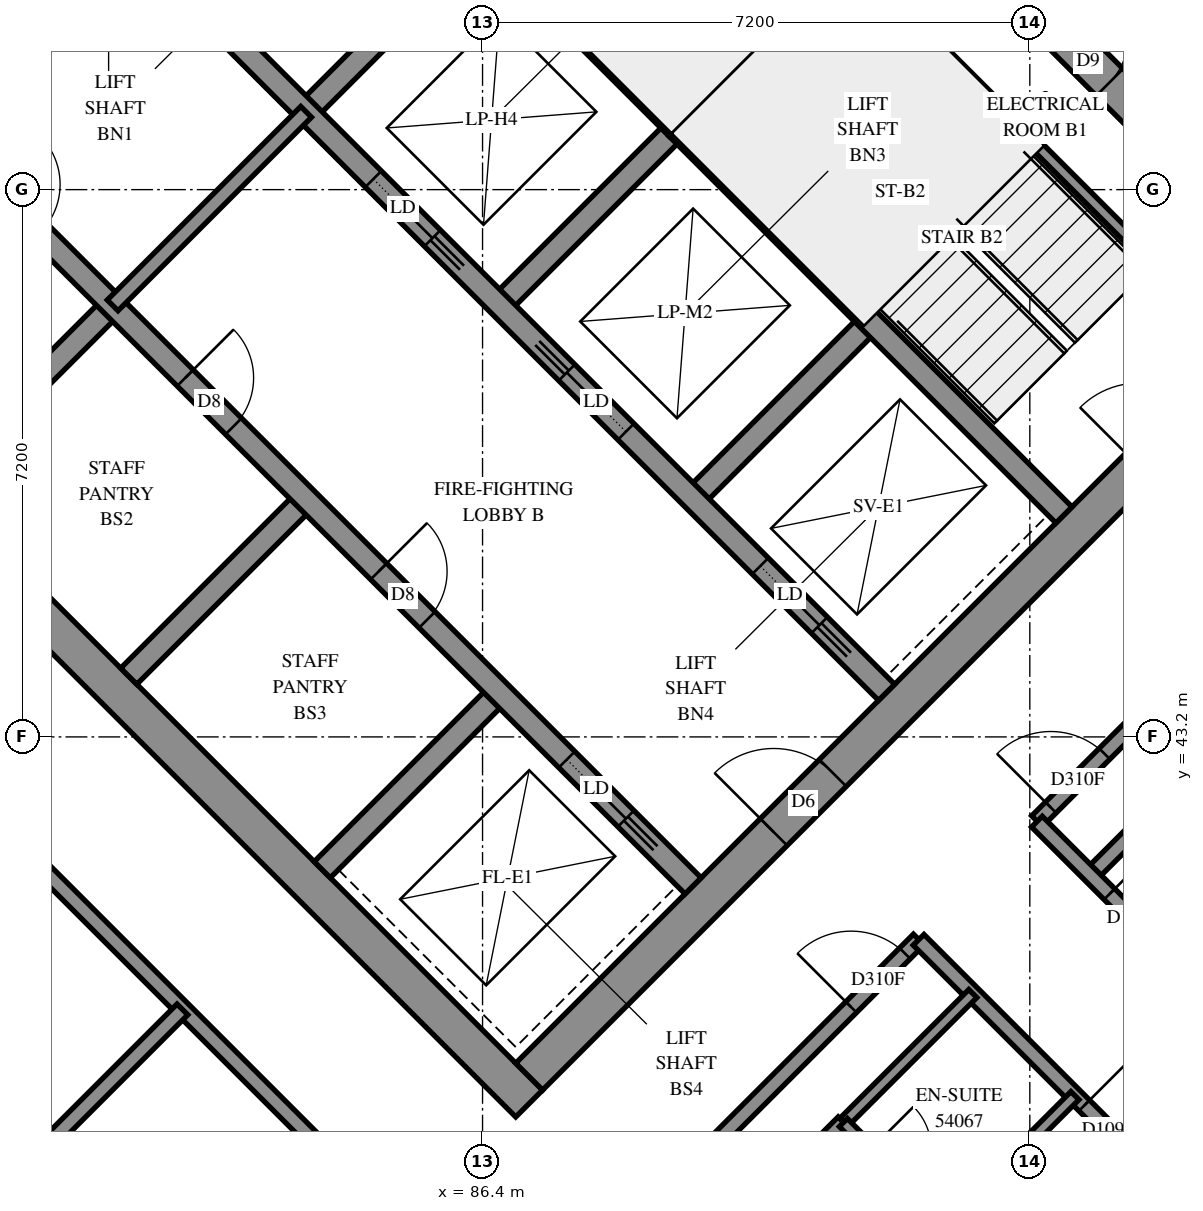
"""IFC4 building model, lengths in metres.
Left out: names, types, materials, properties, quantities, classifications, styles, units other than length and angle.
Written with IfcOpenShell. Run it as: python <this file> out.ifc"""

import sys

from ifc_helpers import new_model, si_unit, direction, frame, frame_2d, origin, place, context, subcontext, project, spatial, rectangle, extrude, element, fill, save


model = new_model("IFC4")
c1 = context("Model", 3, precision=1e-05, world=origin(), true_north=direction((0.0, 1.0)))
c2 = subcontext(c1, "Body", "Model", "MODEL_VIEW")
j1 = project(units=[si_unit("LENGTHUNIT", "METRE"), si_unit("PLANEANGLEUNIT", "RADIAN")], contexts=[c1])
p1 = place(None, origin())
s1 = spatial("IfcSite", under=j1, at=p1, CompositionType="ELEMENT")
p2 = place(p1, origin())
s2 = spatial("IfcBuilding", under=s1, at=p2, CompositionType="ELEMENT")
p3 = place(p2, frame((0.0, 0.0, 199.8)))
s3 = spatial("IfcBuildingStorey", under=s2, at=p3, CompositionType="ELEMENT", Elevation=199.8)
p4 = place(p3, frame((76.124, 49.267, -0.3), z_axis=(0.0, 0.0, 1.0), x_axis=(0.7071067812, -0.7071067812, 0.0)))
e1 = element("IfcWall", 1, at=p4, inside=s3, PredefinedType="SHEAR", context=c2, shape_type="SweptSolid", body=[
    extrude(rectangle(XDim=15.4, YDim=0.5, at=frame_2d((7.7, 0.0))), origin(), (0.0, 0.0, 1.0), 2.7),
])
p5 = place(p3, frame((86.66, 59.802, -0.3), z_axis=(0.0, 0.0, 1.0), x_axis=(0.7071067812, -0.7071067812, 0.0)))
e2 = element("IfcWall", 2, at=p5, inside=s3, PredefinedType="SHEAR", context=c2, shape_type="SweptSolid", body=[
    extrude(rectangle(XDim=15.4, YDim=0.5, at=frame_2d((7.7, 0.0))), origin(), (0.0, 0.0, 1.0), 2.7),
])
p6 = place(p5, frame((10.5, 0.0, 0.3)))
e3 = element("IfcOpeningElement", 3, at=p6, cuts=e2, PredefinedType="OPENING", context=c2, shape_type="SweptSolid", body=[
    extrude(rectangle(XDim=0.8, YDim=2.1, at=frame_2d((0.4, 1.05))), frame((0.0, 0.26, 0.0), z_axis=(0.0, -1.0, 0.0), x_axis=(1.0, 0.0, 0.0)), (0.0, 0.0, 1.0), 0.52),
])
p7 = place(p3, frame((76.478, 49.267, -0.3), z_axis=(0.0, 0.0, 1.0), x_axis=(0.7071067812, 0.7071067812, 0.0)))
e4 = element("IfcWall", 4, at=p7, inside=s3, PredefinedType="SHEAR", context=c2, shape_type="SweptSolid", body=[
    extrude(rectangle(XDim=14.4, YDim=0.5, at=frame_2d((7.2, 0.0))), origin(), (0.0, 0.0, 1.0), 2.7),
])
p8 = place(p7, frame((4.55, 0.0, 0.3)))
e5 = element("IfcOpeningElement", 5, at=p8, cuts=e4, PredefinedType="OPENING", context=c2, shape_type="SweptSolid", body=[
    extrude(rectangle(XDim=1.1, YDim=2.1, at=frame_2d((0.55, 1.05))), frame((0.0, 0.26, 0.0), z_axis=(0.0, -1.0, 0.0), x_axis=(1.0, 0.0, 0.0)), (0.0, 0.0, 1.0), 0.52),
])
p9 = place(p7, frame((11.35, 0.0, 0.3)))
e6 = element("IfcOpeningElement", 6, at=p9, cuts=e4, PredefinedType="OPENING", context=c2, shape_type="SweptSolid", body=[
    extrude(rectangle(XDim=1.1, YDim=2.1, at=frame_2d((0.55, 1.05))), frame((0.0, 0.26, 0.0), z_axis=(0.0, -1.0, 0.0), x_axis=(1.0, 0.0, 0.0)), (0.0, 0.0, 1.0), 0.52),
])
p10 = place(p3, frame((87.013, 38.731, -0.3), z_axis=(0.0, 0.0, 1.0), x_axis=(0.7071067812, 0.7071067812, 0.0)))
e7 = element("IfcWall", 7, at=p10, inside=s3, PredefinedType="SHEAR", context=c2, shape_type="SweptSolid", body=[
    extrude(rectangle(XDim=14.4, YDim=0.5, at=frame_2d((7.2, 0.0))), origin(), (0.0, 0.0, 1.0), 2.7),
])
p11 = place(p10, frame((4.55, 0.0, 0.3)))
e8 = element("IfcOpeningElement", 8, at=p11, cuts=e7, PredefinedType="OPENING", context=c2, shape_type="SweptSolid", body=[
    extrude(rectangle(XDim=1.1, YDim=2.1, at=frame_2d((0.55, 1.05))), frame((0.0, 0.26, 0.0), z_axis=(0.0, -1.0, 0.0), x_axis=(1.0, 0.0, 0.0)), (0.0, 0.0, 1.0), 0.52),
])
p12 = place(p10, frame((11.35, 0.0, 0.3)))
e9 = element("IfcOpeningElement", 9, at=p12, cuts=e7, PredefinedType="OPENING", context=c2, shape_type="SweptSolid", body=[
    extrude(rectangle(XDim=1.1, YDim=2.1, at=frame_2d((0.55, 1.05))), frame((0.0, 0.26, 0.0), z_axis=(0.0, -1.0, 0.0), x_axis=(1.0, 0.0, 0.0)), (0.0, 0.0, 1.0), 0.52),
])
for number, where, z_axis, x_axis in (
    (10, (79.2, 46.544, 0.0), (0.0, 0.0, 1.0), (0.707, 0.707, 0.0)),
    (11, (84.079, 51.423, 0.0), (0.0, 0.0, 1.0), (0.707, 0.707, 0.0)),
):
    element("IfcWall", number, at=place(p3, frame(where, z_axis=z_axis, x_axis=x_axis)), inside=s3, PredefinedType="SOLIDWALL", context=c2, shape_type="SweptSolid", body=[
        extrude(rectangle(XDim=3.3, YDim=0.3, at=frame_2d((1.65, 0.0))), origin(), (0.0, 0.0, 1.0), 3.1),
    ])
p13 = place(p3, frame((81.746, 43.999, 0.0), z_axis=(0.0, 0.0, 1.0), x_axis=(0.7071067812, 0.7071067812, 0.0)))
e12 = element("IfcWall", 12, at=p13, inside=s3, PredefinedType="SOLIDWALL", context=c2, shape_type="SweptSolid", body=[
    extrude(rectangle(XDim=3.3, YDim=0.3, at=frame_2d((1.65, 0.0))), origin(), (0.0, 0.0, 1.0), 3.1),
])
p14 = place(p3, frame((86.625, 48.878, 0.0), z_axis=(0.0, 0.0, 1.0), x_axis=(0.7071067812, 0.7071067812, 0.0)))
e13 = element("IfcWall", 13, at=p14, inside=s3, PredefinedType="SOLIDWALL", context=c2, shape_type="SweptSolid", body=[
    extrude(rectangle(XDim=3.3, YDim=0.3, at=frame_2d((1.65, 0.0))), origin(), (0.0, 0.0, 1.0), 3.1),
])
p15 = place(p3, frame((84.291, 41.453, 0.0), z_axis=(0.0, 0.0, 1.0), x_axis=(0.7071067812, 0.7071067812, 0.0)))
e14 = element("IfcWall", 14, at=p15, inside=s3, PredefinedType="SOLIDWALL", context=c2, shape_type="SweptSolid", body=[
    extrude(rectangle(XDim=3.3, YDim=0.3, at=frame_2d((1.65, 0.0))), origin(), (0.0, 0.0, 1.0), 3.1),
])
p16 = place(p3, frame((89.17, 46.332, 0.0), z_axis=(0.0, 0.0, 1.0), x_axis=(0.7071067812, 0.7071067812, 0.0)))
e15 = element("IfcWall", 15, at=p16, inside=s3, PredefinedType="SOLIDWALL", context=c2, shape_type="SweptSolid", body=[
    extrude(rectangle(XDim=3.3, YDim=0.3, at=frame_2d((1.65, 0.0))), origin(), (0.0, 0.0, 1.0), 3.1),
])
p17 = place(p3, frame((78.988, 51.423, 0.0), z_axis=(0.0, 0.0, 1.0), x_axis=(0.7071067812, -0.7071067812, 0.0)))
e16 = element("IfcWall", 16, at=p17, inside=s3, PredefinedType="SOLIDWALL", context=c2, shape_type="SweptSolid", body=[
    extrude(rectangle(XDim=14.4, YDim=0.3, at=frame_2d((7.2, 0.0))), origin(), (0.0, 0.0, 1.0), 3.1),
])
p18 = place(p17, frame((1.35, 0.0, 0.0)))
e17 = element("IfcOpeningElement", 17, at=p18, cuts=e16, PredefinedType="OPENING", context=c2, shape_type="SweptSolid", body=[
    extrude(rectangle(XDim=0.9, YDim=2.1, at=frame_2d((0.45, 1.05))), frame((0.0, 0.16, 0.0), z_axis=(0.0, -1.0, 0.0), x_axis=(1.0, 0.0, 0.0)), (0.0, 0.0, 1.0), 0.32),
])
p19 = place(p17, frame((4.95, 0.0, 0.0)))
e18 = element("IfcOpeningElement", 18, at=p19, cuts=e16, PredefinedType="OPENING", context=c2, shape_type="SweptSolid", body=[
    extrude(rectangle(XDim=0.9, YDim=2.1, at=frame_2d((0.45, 1.05))), frame((0.0, 0.16, 0.0), z_axis=(0.0, -1.0, 0.0), x_axis=(1.0, 0.0, 0.0)), (0.0, 0.0, 1.0), 0.32),
])
p20 = place(p17, frame((8.55, 0.0, 0.0)))
e19 = element("IfcOpeningElement", 19, at=p20, cuts=e16, PredefinedType="OPENING", context=c2, shape_type="SweptSolid", body=[
    extrude(rectangle(XDim=0.9, YDim=2.1, at=frame_2d((0.45, 1.05))), frame((0.0, 0.16, 0.0), z_axis=(0.0, -1.0, 0.0), x_axis=(1.0, 0.0, 0.0)), (0.0, 0.0, 1.0), 0.32),
])
p21 = place(p17, frame((12.05, 0.0, 0.0)))
e20 = element("IfcOpeningElement", 20, at=p21, cuts=e16, PredefinedType="OPENING", context=c2, shape_type="SweptSolid", body=[
    extrude(rectangle(XDim=1.1, YDim=2.1, at=frame_2d((0.55, 1.05))), frame((0.0, 0.16, 0.0), z_axis=(0.0, -1.0, 0.0), x_axis=(1.0, 0.0, 0.0)), (0.0, 0.0, 1.0), 0.32),
])
p22 = place(p3, frame((81.534, 53.969, 0.0), z_axis=(0.0, 0.0, 1.0), x_axis=(0.707103309, -0.7071102534, 0.0)))
e21 = element("IfcWall", 21, at=p22, inside=s3, PredefinedType="SOLIDWALL", context=c2, shape_type="SweptSolid", body=[
    extrude(rectangle(XDim=14.4, YDim=0.3, at=frame_2d((7.2, 0.0))), origin(), (0.0, 0.0, 1.0), 3.1),
])
p23 = place(p22, frame((1.25, 0.0, 0.0)))
e22 = element("IfcOpeningElement", 22, at=p23, cuts=e21, PredefinedType="OPENING", context=c2, shape_type="SweptSolid", body=[
    extrude(rectangle(XDim=1.1, YDim=2.1, at=frame_2d((0.55, 1.05))), frame((0.0, 0.16, 0.0), z_axis=(0.0, -1.0, 0.0), x_axis=(1.0, 0.0, 0.0)), (0.0, 0.0, 1.0), 0.32),
])
p24 = place(p22, frame((4.85, 0.0, 0.0)))
e23 = element("IfcOpeningElement", 23, at=p24, cuts=e21, PredefinedType="OPENING", context=c2, shape_type="SweptSolid", body=[
    extrude(rectangle(XDim=1.1, YDim=2.1, at=frame_2d((0.55, 1.05))), frame((0.0, 0.16, 0.0), z_axis=(0.0, -1.0, 0.0), x_axis=(1.0, 0.0, 0.0)), (0.0, 0.0, 1.0), 0.32),
])
p25 = place(p22, frame((8.45, 0.0, 0.0)))
e24 = element("IfcOpeningElement", 24, at=p25, cuts=e21, PredefinedType="OPENING", context=c2, shape_type="SweptSolid", body=[
    extrude(rectangle(XDim=1.1, YDim=2.1, at=frame_2d((0.55, 1.05))), frame((0.0, 0.16, 0.0), z_axis=(0.0, -1.0, 0.0), x_axis=(1.0, 0.0, 0.0)), (0.0, 0.0, 1.0), 0.32),
])
p26 = place(p22, frame((12.05, 0.0, 0.0)))
e25 = element("IfcOpeningElement", 25, at=p26, cuts=e21, PredefinedType="OPENING", context=c2, shape_type="SweptSolid", body=[
    extrude(rectangle(XDim=1.1, YDim=2.1, at=frame_2d((0.55, 1.05))), frame((0.0, 0.16, 0.0), z_axis=(0.0, -1.0, 0.0), x_axis=(1.0, 0.0, 0.0)), (0.0, 0.0, 1.0), 0.32),
])
for number, where, z_axis, x_axis in (
    (26, (83.867, 56.302, 0.0), (0.0, 0.0, 1.0), (0.707, -0.707, 0.0)),
    (27, (88.958, 51.211, 0.0), (0.0, 0.0, 1.0), (0.707, -0.707, 0.0)),
):
    element("IfcWall", number, at=place(p3, frame(where, z_axis=z_axis, x_axis=x_axis)), inside=s3, PredefinedType="SOLIDWALL", context=c2, shape_type="SweptSolid", body=[
        extrude(rectangle(XDim=7.2, YDim=0.3, at=frame_2d((3.6, 0.0))), origin(), (0.0, 0.0, 1.0), 3.1),
    ])
p27 = place(p3, frame((88.958, 51.211, 0.0), z_axis=(0.0, 0.0, 1.0), x_axis=(0.7071067812, 0.7071067812, 0.0)))
e28 = element("IfcWall", 28, at=p27, inside=s3, PredefinedType="SOLIDWALL", context=c2, shape_type="SweptSolid", body=[
    extrude(rectangle(XDim=4.2, YDim=0.3, at=frame_2d((2.1, 0.0))), origin(), (0.0, 0.0, 1.0), 3.1),
])
p28 = place(p3, frame((91.313, 53.354, 0.0), z_axis=(0.0, 0.0, 1.0), x_axis=(0.7071067812, -0.7071067812, 0.0)))
e29 = element("IfcWall", 29, at=p28, inside=s3, PredefinedType="PARTITIONING", context=c2, shape_type="SweptSolid", body=[
    extrude(rectangle(XDim=5.95, YDim=0.15, at=frame_2d((2.975, 0.0))), origin(), (0.0, 0.0, 1.0), 3.1),
])
p29 = place(p3, frame((81.534, 48.878, 0.0), z_axis=(0.0, 0.0, 1.0), x_axis=(0.707092892, 0.7071206701, 0.0)))
e30 = element("IfcWall", 30, at=p29, inside=s3, PredefinedType="PARTITIONING", context=c2, shape_type="SweptSolid", body=[
    extrude(rectangle(XDim=3.6, YDim=0.2, at=frame_2d((1.8, 0.0))), origin(), (0.0, 0.0, 1.0), 3.1),
])
p30 = place(p3, frame((93.695, 42.091, 0.0), z_axis=(0.0, 0.0, 1.0), x_axis=(0.7071067812, 0.7071067812, 0.0)))
e31 = element("IfcWall", 31, at=p30, inside=s3, PredefinedType="PARTITIONING", context=c2, shape_type="SweptSolid", body=[
    extrude(rectangle(XDim=9.899, YDim=0.2, at=frame_2d((4.95, 0.0))), origin(), (0.0, 0.0, 1.0), 3.1),
])
p31 = place(p30, frame((0.255, 0.0, 0.0)))
e32 = element("IfcOpeningElement", 32, at=p31, cuts=e31, PredefinedType="OPENING", context=c2, shape_type="SweptSolid", body=[
    extrude(rectangle(XDim=1.0, YDim=2.1, at=frame_2d((0.5, 1.05))), frame((0.0, 0.11, 0.0), z_axis=(0.0, -1.0, 0.0), x_axis=(1.0, 0.0, 0.0)), (0.0, 0.0, 1.0), 0.22),
])
p32 = place(p3, frame((84.984, 31.966, 0.0), z_axis=(0.0, 0.0, 1.0), x_axis=(0.7071067812, 0.7071067812, 0.0)))
e33 = element("IfcWall", 33, at=p32, inside=s3, PredefinedType="PARTITIONING", context=c2, shape_type="SweptSolid", body=[
    extrude(rectangle(XDim=8.719, YDim=0.2, at=frame_2d((4.359, 0.0))), origin(), (0.0, 0.0, 1.0), 3.1),
])
p33 = place(p3, frame((86.835, 35.231, 0.0), z_axis=(0.0, 0.0, 1.0), x_axis=(0.7071067812, 0.7071067812, 0.0)))
e34 = element("IfcWall", 34, at=p33, inside=s3, PredefinedType="PARTITIONING", context=c2, shape_type="SweptSolid", body=[
    extrude(rectangle(XDim=7.501, YDim=0.2, at=frame_2d((3.751, 0.0))), origin(), (0.0, 0.0, 1.0), 3.1),
])
p34 = place(p33, frame((6.243, 0.0, 0.0)))
e35 = element("IfcOpeningElement", 35, at=p34, cuts=e34, PredefinedType="OPENING", context=c2, shape_type="SweptSolid", body=[
    extrude(rectangle(XDim=1.0, YDim=2.1, at=frame_2d((0.5, 1.05))), frame((0.0, 0.11, 0.0), z_axis=(0.0, -1.0, 0.0), x_axis=(1.0, 0.0, 0.0)), (0.0, 0.0, 1.0), 0.22),
])
p35 = place(p3, frame((80.522, 41.553, 0.0), z_axis=(0.0, 0.0, 1.0), x_axis=(0.7071067812, -0.7071067812, 0.0)))
e36 = element("IfcWall", 36, at=p35, inside=s3, PredefinedType="PARTITIONING", context=c2, shape_type="SweptSolid", body=[
    extrude(rectangle(XDim=6.836, YDim=0.2, at=frame_2d((3.418, 0.0))), origin(), (0.0, 0.0, 1.0), 3.1),
])
p36 = place(p3, frame((94.402, 41.382, 0.0), z_axis=(0.0, 0.0, 1.0), x_axis=(0.7072538072, 0.7069597246, 0.0)))
e37 = element("IfcWall", 37, at=p36, inside=s3, PredefinedType="PARTITIONING", context=c2, shape_type="SweptSolid", body=[
    extrude(rectangle(XDim=6.801, YDim=0.2, at=frame_2d((3.4, 0.0))), origin(), (0.0, 0.0, 1.0), 3.1),
])
p37 = place(p3, frame((93.693, 42.085, 0.0), z_axis=(0.0, 0.0, 1.0), x_axis=(0.7071067812, -0.7071067812, 0.0)))
e38 = element("IfcWall", 38, at=p37, inside=s3, PredefinedType="PARTITIONING", context=c2, shape_type="SweptSolid", body=[
    extrude(rectangle(XDim=4.599, YDim=0.2, at=frame_2d((2.3, 0.0))), origin(), (0.0, 0.0, 1.0), 3.1),
])
p38 = place(p37, frame((1.349, 0.0, 0.0)))
e39 = element("IfcOpeningElement", 39, at=p38, cuts=e38, PredefinedType="OPENING", context=c2, shape_type="SweptSolid", body=[
    extrude(rectangle(XDim=0.9, YDim=2.1, at=frame_2d((0.45, 1.05))), frame((0.0, 0.11, 0.0), z_axis=(0.0, -1.0, 0.0), x_axis=(1.0, 0.0, 0.0)), (0.0, 0.0, 1.0), 0.22),
])
p39 = place(p3, frame((92.137, 40.531, 0.0), z_axis=(0.0, 0.0, 1.0), x_axis=(0.7071067812, -0.7071067812, 0.0)))
e40 = element("IfcWall", 40, at=p39, inside=s3, PredefinedType="PARTITIONING", context=c2, shape_type="SweptSolid", body=[
    extrude(rectangle(XDim=4.599, YDim=0.2, at=frame_2d((2.3, 0.0))), origin(), (0.0, 0.0, 1.0), 3.1),
])
p40 = place(p39, frame((3.083, 0.0, 0.0)))
e41 = element("IfcOpeningElement", 41, at=p40, cuts=e40, PredefinedType="OPENING", context=c2, shape_type="SweptSolid", body=[
    extrude(rectangle(XDim=0.9, YDim=2.1, at=frame_2d((0.45, 1.05))), frame((0.0, 0.11, 0.0), z_axis=(0.0, -1.0, 0.0), x_axis=(1.0, 0.0, 0.0)), (0.0, 0.0, 1.0), 0.22),
])
p41 = place(p3, frame((79.651, 36.814, 0.0), z_axis=(0.0, 0.0, 1.0), x_axis=(0.7071194064, 0.7070941557, 0.0)))
e42 = element("IfcWall", 42, at=p41, inside=s3, PredefinedType="PARTITIONING", context=c2, shape_type="SweptSolid", body=[
    extrude(rectangle(XDim=3.96, YDim=0.2, at=frame_2d((1.98, 0.0))), origin(), (0.0, 0.0, 1.0), 3.1),
])
for number, where, z_axis, x_axis in (
    (43, (91.152, 38.128, 0.0), (0.0, 0.0, 1.0), (0.708, 0.707, 0.0)),
    (44, (92.497, 36.783, 0.0), (0.0, 0.0, 1.0), (0.707, 0.708, 0.0)),
):
    element("IfcWall", number, at=place(p3, frame(where, z_axis=z_axis, x_axis=x_axis)), inside=s3, PredefinedType="PARTITIONING", context=c2, shape_type="SweptSolid", body=[
        extrude(rectangle(XDim=2.4, YDim=0.15, at=frame_2d((1.2, 0.0))), origin(), (0.0, 0.0, 1.0), 3.1),
    ])
p42 = place(p3, frame((91.147, 38.127, 0.0), z_axis=(0.0, 0.0, 1.0), x_axis=(0.7071067812, -0.7071067812, 0.0)))
e45 = element("IfcWall", 45, at=p42, inside=s3, PredefinedType="PARTITIONING", context=c2, shape_type="SweptSolid", body=[
    extrude(rectangle(XDim=1.901, YDim=0.15, at=frame_2d((0.95, 0.0))), origin(), (0.0, 0.0, 1.0), 3.1),
])
p43 = place(p42, frame((0.506, 0.0, 0.0)))
e46 = element("IfcOpeningElement", 46, at=p43, cuts=e45, PredefinedType="OPENING", context=c2, shape_type="SweptSolid", body=[
    extrude(rectangle(XDim=0.8, YDim=2.1, at=frame_2d((0.4, 1.05))), frame((0.0, 0.085, 0.0), z_axis=(0.0, -1.0, 0.0), x_axis=(1.0, 0.0, 0.0)), (0.0, 0.0, 1.0), 0.17),
])
p44 = place(p6, origin())
e47 = element("IfcDoor", 47, at=p44, inside=s3, OperationType="SINGLE_SWING_RIGHT", PredefinedType="DOOR", context=c2, shape_type="SweptSolid", body=[
    extrude(rectangle(XDim=0.8, YDim=2.1, at=frame_2d((0.4, 1.05))), frame((0.0, 0.025, 0.0), z_axis=(0.0, -1.0, 0.0), x_axis=(1.0, 0.0, 0.0)), (0.0, 0.0, 1.0), 0.05),
])
fill(e3, e47)
p45 = place(p11, origin())
e48 = element("IfcDoor", 48, at=p45, inside=s3, OperationType="DOUBLE_DOOR_SINGLE_SWING", PredefinedType="DOOR", context=c2, shape_type="SweptSolid", body=[
    extrude(rectangle(XDim=1.1, YDim=2.1, at=frame_2d((0.55, 1.05))), frame((0.0, 0.025, 0.0), z_axis=(0.0, -1.0, 0.0), x_axis=(1.0, 0.0, 0.0)), (0.0, 0.0, 1.0), 0.05),
])
fill(e8, e48)
p46 = place(p19, origin())
e49 = element("IfcDoor", 49, at=p46, inside=s3, OperationType="SINGLE_SWING_LEFT", PredefinedType="DOOR", context=c2, shape_type="SweptSolid", body=[
    extrude(rectangle(XDim=0.9, YDim=2.1, at=frame_2d((0.45, 1.05))), frame((0.0, 0.025, 0.0), z_axis=(0.0, -1.0, 0.0), x_axis=(1.0, 0.0, 0.0)), (0.0, 0.0, 1.0), 0.05),
])
fill(e18, e49)
p47 = place(p20, origin())
e50 = element("IfcDoor", 50, at=p47, inside=s3, OperationType="SINGLE_SWING_LEFT", PredefinedType="DOOR", context=c2, shape_type="SweptSolid", body=[
    extrude(rectangle(XDim=0.9, YDim=2.1, at=frame_2d((0.45, 1.05))), frame((0.0, 0.025, 0.0), z_axis=(0.0, -1.0, 0.0), x_axis=(1.0, 0.0, 0.0)), (0.0, 0.0, 1.0), 0.05),
])
fill(e19, e50)
p48 = place(p21, origin())
e51 = element("IfcDoor", 51, at=p48, inside=s3, OperationType="SLIDING_TO_RIGHT", PredefinedType="DOOR", context=c2, shape_type="SweptSolid", body=[
    extrude(rectangle(XDim=1.1, YDim=2.1, at=frame_2d((0.55, 1.05))), frame((0.0, 0.025, 0.0), z_axis=(0.0, -1.0, 0.0), x_axis=(1.0, 0.0, 0.0)), (0.0, 0.0, 1.0), 0.05),
])
fill(e20, e51)
p49 = place(p24, origin())
e52 = element("IfcDoor", 52, at=p49, inside=s3, OperationType="SLIDING_TO_RIGHT", PredefinedType="DOOR", context=c2, shape_type="SweptSolid", body=[
    extrude(rectangle(XDim=1.1, YDim=2.1, at=frame_2d((0.55, 1.05))), frame((0.0, 0.025, 0.0), z_axis=(0.0, -1.0, 0.0), x_axis=(1.0, 0.0, 0.0)), (0.0, 0.0, 1.0), 0.05),
])
fill(e23, e52)
p50 = place(p25, origin())
e53 = element("IfcDoor", 53, at=p50, inside=s3, OperationType="SLIDING_TO_LEFT", PredefinedType="DOOR", context=c2, shape_type="SweptSolid", body=[
    extrude(rectangle(XDim=1.1, YDim=2.1, at=frame_2d((0.55, 1.05))), frame((0.0, 0.025, 0.0), z_axis=(0.0, -1.0, 0.0), x_axis=(1.0, 0.0, 0.0)), (0.0, 0.0, 1.0), 0.05),
])
fill(e24, e53)
p51 = place(p26, origin())
e54 = element("IfcDoor", 54, at=p51, inside=s3, OperationType="SLIDING_TO_RIGHT", PredefinedType="DOOR", context=c2, shape_type="SweptSolid", body=[
    extrude(rectangle(XDim=1.1, YDim=2.1, at=frame_2d((0.55, 1.05))), frame((0.0, 0.025, 0.0), z_axis=(0.0, -1.0, 0.0), x_axis=(1.0, 0.0, 0.0)), (0.0, 0.0, 1.0), 0.05),
])
fill(e25, e54)
p52 = place(p31, origin())
e55 = element("IfcDoor", 55, at=p52, inside=s3, OperationType="SINGLE_SWING_LEFT", PredefinedType="DOOR", context=c2, shape_type="SweptSolid", body=[
    extrude(rectangle(XDim=1.0, YDim=2.1, at=frame_2d((0.5, 1.05))), frame((0.0, 0.025, 0.0), z_axis=(0.0, -1.0, 0.0), x_axis=(1.0, 0.0, 0.0)), (0.0, 0.0, 1.0), 0.05),
])
fill(e32, e55)
p53 = place(p34, origin())
e56 = element("IfcDoor", 56, at=p53, inside=s3, OperationType="SINGLE_SWING_RIGHT", PredefinedType="DOOR", context=c2, shape_type="SweptSolid", body=[
    extrude(rectangle(XDim=1.0, YDim=2.1, at=frame_2d((0.5, 1.05))), frame((0.0, 0.025, 0.0), z_axis=(0.0, -1.0, 0.0), x_axis=(1.0, 0.0, 0.0)), (0.0, 0.0, 1.0), 0.05),
])
fill(e35, e56)
p54 = place(p38, origin())
e57 = element("IfcDoor", 57, at=p54, inside=s3, OperationType="SINGLE_SWING_RIGHT", PredefinedType="DOOR", context=c2, shape_type="SweptSolid", body=[
    extrude(rectangle(XDim=0.9, YDim=2.1, at=frame_2d((0.45, 1.05))), frame((0.0, 0.025, 0.0), z_axis=(0.0, -1.0, 0.0), x_axis=(1.0, 0.0, 0.0)), (0.0, 0.0, 1.0), 0.05),
])
fill(e39, e57)
p55 = place(p40, origin())
e58 = element("IfcDoor", 58, at=p55, inside=s3, OperationType="SINGLE_SWING_LEFT", PredefinedType="DOOR", context=c2, shape_type="SweptSolid", body=[
    extrude(rectangle(XDim=0.9, YDim=2.1, at=frame_2d((0.45, 1.05))), frame((0.0, 0.025, 0.0), z_axis=(0.0, -1.0, 0.0), x_axis=(1.0, 0.0, 0.0)), (0.0, 0.0, 1.0), 0.05),
])
fill(e41, e58)
save(model, sys.argv[1])
